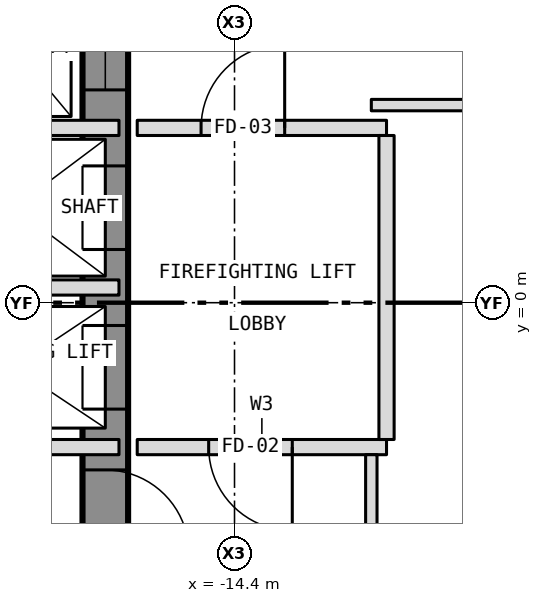
"""IFC4 building model, lengths in metres.
Left out: names, types, materials, properties, quantities, classifications, styles, units other than length and angle.
Written with IfcOpenShell. Run it as: python <this file> out.ifc"""

import sys

from ifc_helpers import new_model, si_unit, direction, frame, frame_2d, origin, place, context, subcontext, project, spatial, rectangle, extrude, element, fill, save


model = new_model("IFC4")
c1 = context("Model", 3, precision=1e-05, world=origin(), true_north=direction((0.0, 1.0)))
c2 = subcontext(c1, "Body", "Model", "MODEL_VIEW")
j1 = project(units=[si_unit("LENGTHUNIT", "METRE"), si_unit("PLANEANGLEUNIT", "RADIAN")], contexts=[c1])
p1 = place(None, origin())
s1 = spatial("IfcSite", under=j1, at=p1, CompositionType="ELEMENT")
p2 = place(p1, origin())
s2 = spatial("IfcBuilding", under=s1, at=p2, CompositionType="ELEMENT")
p3 = place(p2, frame((0.0, 0.0, 113.5)))
s3 = spatial("IfcBuildingStorey", under=s2, at=p3, CompositionType="ELEMENT", Elevation=113.5)
p4 = place(p3, frame((-16.1, -10.8, 0.0), z_axis=(0.0, 0.0, 1.0), x_axis=(0.0, 1.0, 0.0)))
e1 = element("IfcWall", 1, at=p4, inside=s3, PredefinedType="SHEAR", context=c2, shape_type="SweptSolid", body=[
    extrude(rectangle(XDim=21.6, YDim=0.6, at=frame_2d((10.8, 0.0))), origin(), (0.0, 0.0, 1.0), 3.25),
])
p5 = place(p4, frame((9.4, 0.0, 0.0)))
e2 = element("IfcOpeningElement", 2, at=p5, cuts=e1, PredefinedType="OPENING", context=c2, shape_type="SweptSolid", body=[
    extrude(rectangle(XDim=1.1, YDim=2.1, at=frame_2d((0.55, 1.05))), frame((0.0, 0.312, 0.0), z_axis=(0.0, -1.0, 0.0), x_axis=(1.0, 0.0, 0.0)), (0.0, 0.0, 1.0), 0.624),
])
p6 = place(p4, frame((11.5, 0.0, 0.0)))
e3 = element("IfcOpeningElement", 3, at=p6, cuts=e1, PredefinedType="OPENING", context=c2, shape_type="SweptSolid", body=[
    extrude(rectangle(XDim=1.1, YDim=2.1, at=frame_2d((0.55, 1.05))), frame((0.0, 0.312, 0.0), z_axis=(0.0, -1.0, 0.0), x_axis=(1.0, 0.0, 0.0)), (0.0, 0.0, 1.0), 0.624),
])
p7 = place(p4, frame((13.6, 0.0, 0.0)))
e4 = element("IfcOpeningElement", 4, at=p7, cuts=e1, PredefinedType="OPENING", context=c2, shape_type="SweptSolid", body=[
    extrude(rectangle(XDim=1.1, YDim=2.1, at=frame_2d((0.55, 1.05))), frame((0.0, 0.312, 0.0), z_axis=(0.0, -1.0, 0.0), x_axis=(1.0, 0.0, 0.0)), (0.0, 0.0, 1.0), 0.624),
])
p8 = place(p4, frame((15.7, 0.0, 0.0)))
e5 = element("IfcOpeningElement", 5, at=p8, cuts=e1, PredefinedType="OPENING", context=c2, shape_type="SweptSolid", body=[
    extrude(rectangle(XDim=1.1, YDim=2.1, at=frame_2d((0.55, 1.05))), frame((0.0, 0.312, 0.0), z_axis=(0.0, -1.0, 0.0), x_axis=(1.0, 0.0, 0.0)), (0.0, 0.0, 1.0), 0.624),
])
p9 = place(p4, frame((17.8, 0.0, 0.0)))
e6 = element("IfcOpeningElement", 6, at=p9, cuts=e1, PredefinedType="OPENING", context=c2, shape_type="SweptSolid", body=[
    extrude(rectangle(XDim=1.1, YDim=2.1, at=frame_2d((0.55, 1.05))), frame((0.0, 0.312, 0.0), z_axis=(0.0, -1.0, 0.0), x_axis=(1.0, 0.0, 0.0)), (0.0, 0.0, 1.0), 0.624),
])
p10 = place(p4, frame((0.758, 0.0, 0.0)))
e7 = element("IfcOpeningElement", 7, at=p10, cuts=e1, PredefinedType="OPENING", context=c2, shape_type="SweptSolid", body=[
    extrude(rectangle(XDim=1.1, YDim=2.1, at=frame_2d((0.55, 1.05))), frame((0.0, 0.312, 0.0), z_axis=(0.0, -1.0, 0.0), x_axis=(1.0, 0.0, 0.0)), (0.0, 0.0, 1.0), 0.624),
])
p11 = place(p4, frame((7.5, 0.0, 0.0)))
e8 = element("IfcOpeningElement", 8, at=p11, cuts=e1, PredefinedType="OPENING", context=c2, shape_type="SweptSolid", body=[
    extrude(rectangle(XDim=1.1, YDim=2.1, at=frame_2d((0.55, 1.05))), frame((0.0, 0.312, 0.0), z_axis=(0.0, -1.0, 0.0), x_axis=(1.0, 0.0, 0.0)), (0.0, 0.0, 1.0), 0.624),
])
p12 = place(p3, frame((-22.68, -1.9, 0.0), z_axis=(0.0, 0.0, 1.0), x_axis=(1.0, 0.0, 0.0)))
e9 = element("IfcWall", 9, at=p12, inside=s3, PredefinedType="PARTITIONING", context=c2, shape_type="SweptSolid", body=[
    extrude(rectangle(XDim=6.76, YDim=0.2, at=frame_2d((3.38, 0.0))), origin(), (0.0, 0.0, 1.0), 3.25),
])
p13 = place(p12, frame((2.12, 0.0, 0.0)))
e10 = element("IfcOpeningElement", 10, at=p13, cuts=e9, PredefinedType="OPENING", context=c2, shape_type="SweptSolid", body=[
    extrude(rectangle(XDim=0.9, YDim=2.1, at=frame_2d((0.45, 1.05))), frame((0.0, 0.112, 0.0), z_axis=(0.0, -1.0, 0.0), x_axis=(1.0, 0.0, 0.0)), (0.0, 0.0, 1.0), 0.224),
])
p14 = place(p3, frame((-15.68, -1.9, 0.0), z_axis=(0.0, 0.0, 1.0), x_axis=(1.0, 0.0, 0.0)))
e11 = element("IfcWall", 11, at=p14, inside=s3, PredefinedType="PARTITIONING", context=c2, shape_type="SweptSolid", body=[
    extrude(rectangle(XDim=3.28, YDim=0.2, at=frame_2d((1.64, 0.0))), origin(), (0.0, 0.0, 1.0), 3.35),
])
p15 = place(p14, frame((0.94, 0.0, 0.0)))
e12 = element("IfcOpeningElement", 12, at=p15, cuts=e11, PredefinedType="OPENING", context=c2, shape_type="SweptSolid", body=[
    extrude(rectangle(XDim=1.1, YDim=2.1, at=frame_2d((0.55, 1.05))), frame((0.0, 0.112, 0.0), z_axis=(0.0, -1.0, 0.0), x_axis=(1.0, 0.0, 0.0)), (0.0, 0.0, 1.0), 0.224),
])
for number, where, z_axis, x_axis in (
    (13, (-18.8, 0.2, 0.0), (0.0, 0.0, 1.0), (1.0, 0.0, 0.0)),
    (14, (-18.8, 2.3, 0.0), (0.0, 0.0, 1.0), (1.0, 0.0, 0.0)),
):
    element("IfcWall", number, at=place(p3, frame(where, z_axis=z_axis, x_axis=x_axis)), inside=s3, PredefinedType="PARTITIONING", context=c2, shape_type="SweptSolid", body=[
        extrude(rectangle(XDim=2.88, YDim=0.2, at=frame_2d((1.44, 0.0))), origin(), (0.0, 0.0, 1.0), 3.25),
    ])
p16 = place(p3, frame((-15.68, 2.3, 0.0), z_axis=(0.0, 0.0, 1.0), x_axis=(1.0, 0.0, 0.0)))
e15 = element("IfcWall", 15, at=p16, inside=s3, PredefinedType="PARTITIONING", context=c2, shape_type="SweptSolid", body=[
    extrude(rectangle(XDim=3.28, YDim=0.2, at=frame_2d((1.64, 0.0))), origin(), (0.0, 0.0, 1.0), 3.35),
])
p17 = place(p16, frame((0.84, 0.0, 0.0)))
e16 = element("IfcOpeningElement", 16, at=p17, cuts=e15, PredefinedType="OPENING", context=c2, shape_type="SweptSolid", body=[
    extrude(rectangle(XDim=1.1, YDim=2.1, at=frame_2d((0.55, 1.05))), frame((0.0, 0.112, 0.0), z_axis=(0.0, -1.0, 0.0), x_axis=(1.0, 0.0, 0.0)), (0.0, 0.0, 1.0), 0.224),
])
p18 = place(p3, frame((-12.6, 2.6, 0.0), z_axis=(0.0, 0.0, 1.0), x_axis=(1.0, 0.0, 0.0)))
e17 = element("IfcWall", 17, at=p18, inside=s3, PredefinedType="PARTITIONING", context=c2, shape_type="SweptSolid", body=[
    extrude(rectangle(XDim=16.7, YDim=0.15, at=frame_2d((8.35, 0.0))), origin(), (0.0, 0.0, 1.0), 3.35),
])
p19 = place(p18, frame((5.85, 0.0, 0.0)))
e18 = element("IfcOpeningElement", 18, at=p19, cuts=e17, PredefinedType="OPENING", context=c2, shape_type="SweptSolid", body=[
    extrude(rectangle(XDim=0.9, YDim=2.1, at=frame_2d((0.45, 1.05))), frame((0.0, 0.087, 0.0), z_axis=(0.0, -1.0, 0.0), x_axis=(1.0, 0.0, 0.0)), (0.0, 0.0, 1.0), 0.174),
])
p20 = place(p3, frame((-12.6, -12.525, 0.0), z_axis=(0.0, 0.0, 1.0), x_axis=(0.0, 1.0, 0.0)))
e19 = element("IfcWall", 19, at=p20, inside=s3, PredefinedType="PARTITIONING", context=c2, shape_type="SweptSolid", body=[
    extrude(rectangle(XDim=10.525, YDim=0.15, at=frame_2d((5.262, 0.0))), origin(), (0.0, 0.0, 1.0), 3.35),
])
p21 = place(p3, frame((-12.4, -1.8, 0.0), z_axis=(0.0, 0.0, 1.0), x_axis=(0.0, 1.0, 0.0)))
e20 = element("IfcWall", 20, at=p21, inside=s3, PredefinedType="PARTITIONING", context=c2, shape_type="SweptSolid", body=[
    extrude(rectangle(XDim=4.0, YDim=0.2, at=frame_2d((2.0, 0.0))), origin(), (0.0, 0.0, 1.0), 3.35),
])
p22 = place(p5, origin())
e21 = element("IfcDoor", 21, at=p22, inside=s3, OperationType="SLIDING_TO_LEFT", PredefinedType="DOOR", context=c2, shape_type="SweptSolid", body=[
    extrude(rectangle(XDim=1.1, YDim=2.1, at=frame_2d((0.55, 1.05))), frame((0.0, 0.025, 0.0), z_axis=(0.0, -1.0, 0.0), x_axis=(1.0, 0.0, 0.0)), (0.0, 0.0, 1.0), 0.05),
])
fill(e2, e21)
p23 = place(p6, origin())
e22 = element("IfcDoor", 22, at=p23, inside=s3, OperationType="SLIDING_TO_LEFT", PredefinedType="DOOR", context=c2, shape_type="SweptSolid", body=[
    extrude(rectangle(XDim=1.1, YDim=2.1, at=frame_2d((0.55, 1.05))), frame((0.0, 0.025, 0.0), z_axis=(0.0, -1.0, 0.0), x_axis=(1.0, 0.0, 0.0)), (0.0, 0.0, 1.0), 0.05),
])
fill(e3, e22)
p24 = place(p7, origin())
e23 = element("IfcDoor", 23, at=p24, inside=s3, OperationType="SLIDING_TO_LEFT", PredefinedType="DOOR", context=c2, shape_type="SweptSolid", body=[
    extrude(rectangle(XDim=1.1, YDim=2.1, at=frame_2d((0.55, 1.05))), frame((0.0, 0.025, 0.0), z_axis=(0.0, -1.0, 0.0), x_axis=(1.0, 0.0, 0.0)), (0.0, 0.0, 1.0), 0.05),
])
fill(e4, e23)
p25 = place(p11, origin())
e24 = element("IfcDoor", 24, at=p25, inside=s3, OperationType="SINGLE_SWING_LEFT", PredefinedType="DOOR", context=c2, shape_type="SweptSolid", body=[
    extrude(rectangle(XDim=1.1, YDim=2.1, at=frame_2d((0.55, 1.05))), frame((0.0, 0.025, 0.0), z_axis=(0.0, -1.0, 0.0), x_axis=(1.0, 0.0, 0.0)), (0.0, 0.0, 1.0), 0.05),
])
fill(e8, e24)
p26 = place(p15, origin())
e25 = element("IfcDoor", 25, at=p26, inside=s3, OperationType="SINGLE_SWING_RIGHT", PredefinedType="DOOR", context=c2, shape_type="SweptSolid", body=[
    extrude(rectangle(XDim=1.1, YDim=2.1, at=frame_2d((0.55, 1.05))), frame((0.0, 0.025, 0.0), z_axis=(0.0, -1.0, 0.0), x_axis=(1.0, 0.0, 0.0)), (0.0, 0.0, 1.0), 0.05),
])
fill(e12, e25)
p27 = place(p17, origin())
e26 = element("IfcDoor", 26, at=p27, inside=s3, OperationType="SINGLE_SWING_RIGHT", PredefinedType="DOOR", context=c2, shape_type="SweptSolid", body=[
    extrude(rectangle(XDim=1.1, YDim=2.1, at=frame_2d((0.55, 1.05))), frame((0.0, 0.025, 0.0), z_axis=(0.0, -1.0, 0.0), x_axis=(1.0, 0.0, 0.0)), (0.0, 0.0, 1.0), 0.05),
])
fill(e16, e26)
save(model, sys.argv[1])
